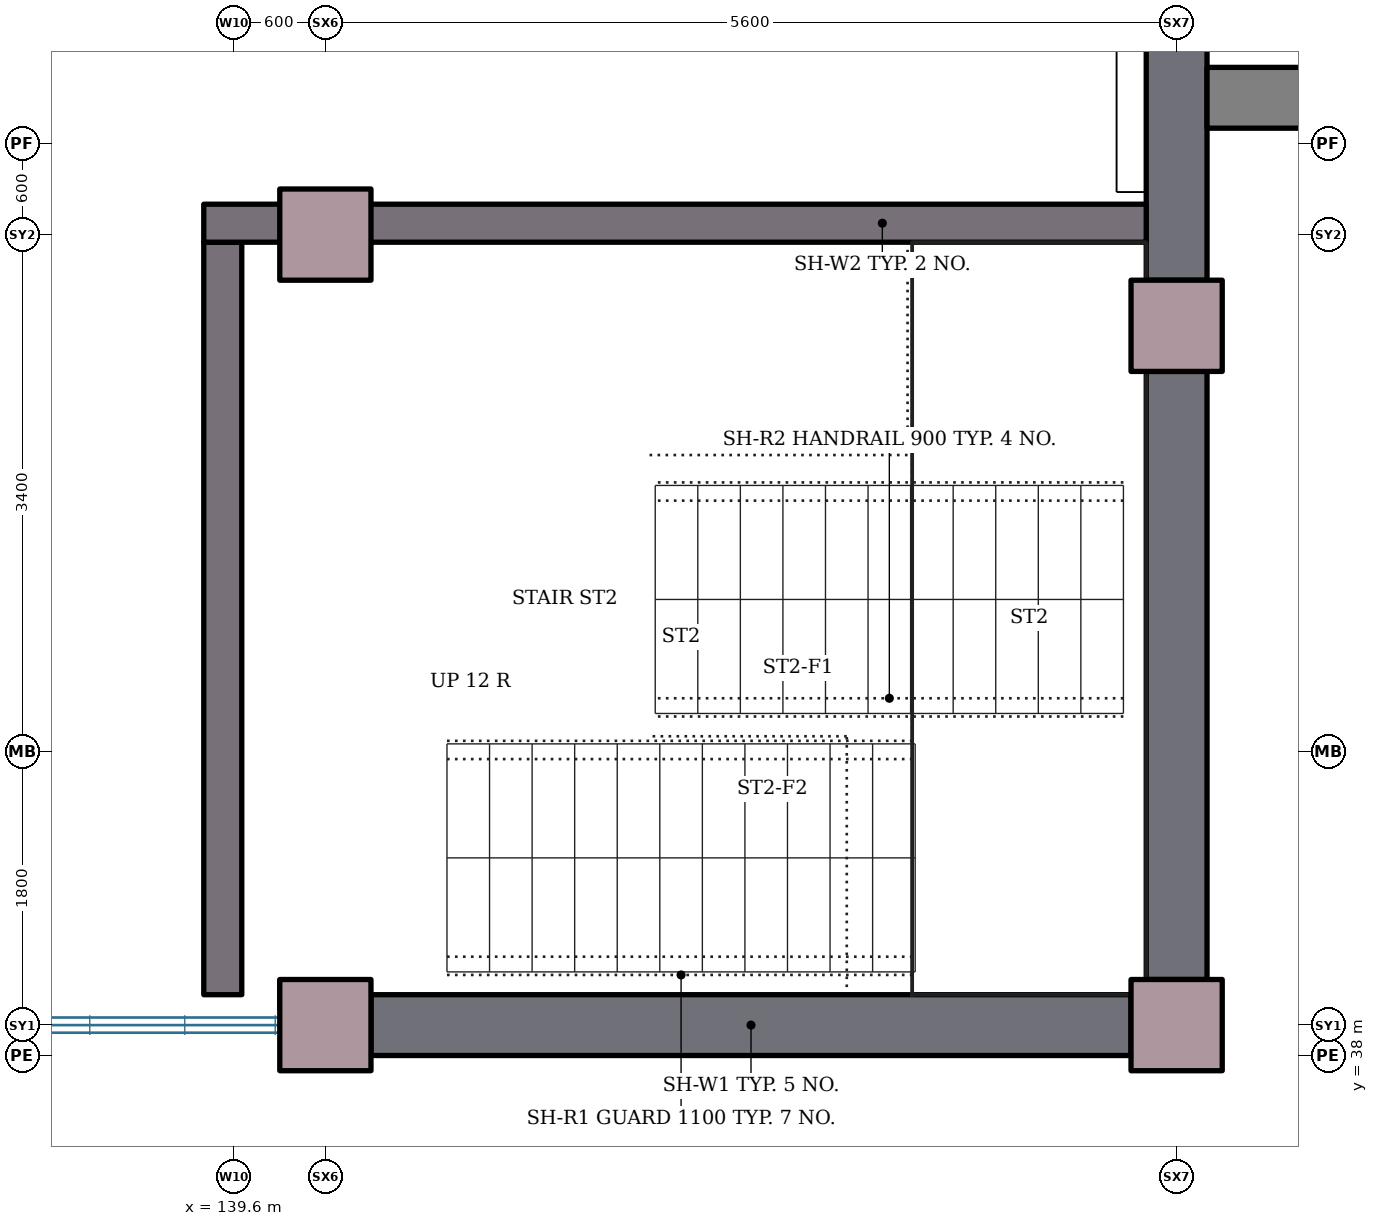
"""IFC4 building model, lengths in metres.
Left out: names, types, materials, properties, quantities, classifications, styles, units other than length and angle.
Written with IfcOpenShell. Run it as: python <this file> out.ifc"""

import sys

from ifc_helpers import new_model, si_unit, direction, frame, frame_2d, origin, origin_2d, place, context, subcontext, project, spatial, rectangle, extrude, element, fill, save


model = new_model("IFC4")
c1 = context("Model", 3, precision=1e-05, world=origin(), true_north=direction((0.0, 1.0)))
c2 = subcontext(c1, "Body", "Model", "MODEL_VIEW")
j1 = project(units=[si_unit("LENGTHUNIT", "METRE"), si_unit("PLANEANGLEUNIT", "RADIAN")], contexts=[c1])
p1 = place(None, origin())
s1 = spatial("IfcSite", under=j1, at=p1, CompositionType="ELEMENT")
p2 = place(p1, origin())
s2 = spatial("IfcBuilding", under=s1, at=p2, CompositionType="ELEMENT")
p3 = place(p2, frame((0.0, 0.0, 4.2)))
s3 = spatial("IfcBuildingStorey", under=s2, at=p3, CompositionType="ELEMENT", Elevation=4.2)
for number, where, z_axis, x_axis in (
    (1, (140.2, 38.2, 0.0), (0.0, 0.0, 1.0), (1.0, 0.0, 0.0)),
    (2, (145.8, 38.2, 0.0), (0.0, 0.0, 1.0), (1.0, 0.0, 0.0)),
    (3, (145.8, 42.8, 0.0), (0.0, 0.0, 1.0), (1.0, 0.0, 0.0)),
    (4, (140.2, 43.4, 0.0), (0.0, 0.0, 1.0), (1.0, 0.0, 0.0)),
):
    element("IfcColumn", number, at=place(p3, frame(where, z_axis=z_axis, x_axis=x_axis)), inside=s3, PredefinedType="COLUMN", context=c2, shape_type="SweptSolid", body=[
        extrude(rectangle(XDim=0.6, YDim=0.6, at=origin_2d()), origin(), (0.0, 0.0, 1.0), 4.2),
    ])
p4 = place(p3, frame((145.5, 38.2, 0.0), z_axis=(0.0, 0.0, 1.0), x_axis=(-1.0, 0.0, 0.0)))
e5 = element("IfcWall", 5, at=p4, inside=s3, PredefinedType="SOLIDWALL", context=c2, shape_type="SweptSolid", body=[
    extrude(rectangle(XDim=5.0, YDim=0.4, at=frame_2d((2.5, 0.0))), origin(), (0.0, 0.0, 1.0), 4.2),
])
p5 = place(p3, frame((145.8, 38.5, 0.0), z_axis=(0.0, 0.0, 1.0), x_axis=(0.0, 1.0, 0.0)))
e6 = element("IfcWall", 6, at=p5, inside=s3, PredefinedType="SOLIDWALL", context=c2, shape_type="SweptSolid", body=[
    extrude(rectangle(XDim=4.0, YDim=0.4, at=frame_2d((2.0, 0.0))), origin(), (0.0, 0.0, 1.0), 4.2),
])
p6 = place(p5, frame((1.55, 0.0, 0.9)))
e7 = element("IfcOpeningElement", 7, at=p6, cuts=e6, PredefinedType="OPENING", context=c2, shape_type="SweptSolid", body=[
    extrude(rectangle(XDim=0.9, YDim=1.5, at=frame_2d((0.45, 0.75))), frame((0.0, 0.21, 0.0), z_axis=(0.0, -1.0, 0.0), x_axis=(1.0, 0.0, 0.0)), (0.0, 0.0, 1.0), 0.42),
])
p7 = place(p3, frame((145.8, 43.1, 0.0), z_axis=(0.0, 0.0, 1.0), x_axis=(0.0, 1.0, 0.0)))
e8 = element("IfcWall", 8, at=p7, inside=s3, PredefinedType="SOLIDWALL", context=c2, shape_type="SweptSolid", body=[
    extrude(rectangle(XDim=4.0, YDim=0.4, at=frame_2d((2.0, 0.0))), origin(), (0.0, 0.0, 1.0), 4.2),
])
p8 = place(p7, frame((1.0, 0.0, 2.4)))
e9 = element("IfcOpeningElement", 9, at=p8, cuts=e8, PredefinedType="OPENING", context=c2, shape_type="SweptSolid", body=[
    extrude(rectangle(XDim=2.0, YDim=1.2, at=frame_2d((1.0, 0.6))), frame((0.0, 0.21, 0.0), z_axis=(0.0, -1.0, 0.0), x_axis=(1.0, 0.0, 0.0)), (0.0, 0.0, 1.0), 0.42),
])
p9 = place(p3, frame((139.525, 38.4, 0.0), z_axis=(0.0, 0.0, 1.0), x_axis=(0.0, 1.0, 0.0)))
e10 = element("IfcWall", 10, at=p9, inside=s3, PredefinedType="SHEAR", context=c2, shape_type="SweptSolid", body=[
    extrude(rectangle(XDim=4.95, YDim=0.25, at=frame_2d((2.475, 0.0))), origin(), (0.0, 0.0, 1.0), 4.2),
])
p10 = place(p3, frame((139.4, 43.475, 0.0), z_axis=(0.0, 0.0, 1.0), x_axis=(1.0, 0.0, 0.0)))
e11 = element("IfcWall", 11, at=p10, inside=s3, PredefinedType="SHEAR", context=c2, shape_type="SweptSolid", body=[
    extrude(rectangle(XDim=6.2, YDim=0.25, at=frame_2d((3.1, 0.0))), origin(), (0.0, 0.0, 1.0), 4.2),
])
p11 = place(p10, frame((1.186, 0.0, 0.0)))
e12 = element("IfcOpeningElement", 12, at=p11, cuts=e11, PredefinedType="OPENING", context=c2, shape_type="SweptSolid", body=[
    extrude(rectangle(XDim=1.8, YDim=2.1, at=frame_2d((0.9, 1.05))), frame((0.0, 0.135, 0.0), z_axis=(0.0, -1.0, 0.0), x_axis=(1.0, 0.0, 0.0)), (0.0, 0.0, 1.0), 0.27),
])
p12 = place(p3, frame((148.1, 44.3, 0.0), z_axis=(0.0, 0.0, 1.0), x_axis=(-1.0, 0.0, 0.0)))
e13 = element("IfcWall", 13, at=p12, inside=s3, PredefinedType="STANDARD", context=c2, shape_type="SweptSolid", body=[
    extrude(rectangle(XDim=2.1, YDim=0.4, at=frame_2d((1.05, 0.0))), origin(), (0.0, 0.0, 1.0), 4.2),
])
p13 = place(p3, frame((139.9, 38.4, 0.0), z_axis=(0.0, 0.0, 1.0), x_axis=(1.0, 0.0, 0.0)))
e14 = element("IfcWall", 14, at=p13, inside=s3, PredefinedType="PARTITIONING", context=c2, shape_type="SweptSolid", body=[
    extrude(rectangle(XDim=0.52, YDim=0.19, at=frame_2d((0.26, 0.0))), origin(), (0.0, 0.0, 1.0), 3.98),
])
p14 = place(p3, frame((145.5, 59.92, 0.0), z_axis=(0.0, 0.0, 1.0), x_axis=(0.0, -1.0, 0.0)))
e15 = element("IfcWall", 15, at=p14, inside=s3, PredefinedType="PARTITIONING", context=c2, shape_type="SweptSolid", body=[
    extrude(rectangle(XDim=16.24, YDim=0.19, at=frame_2d((8.12, 0.0))), origin(), (0.0, 0.0, 1.0), 3.98),
])
p15 = place(p3, frame((145.6, 42.58, 0.0), z_axis=(0.0, 0.0, 1.0), x_axis=(0.0, 1.0, 0.0)))
e16 = element("IfcWall", 16, at=p15, inside=s3, PredefinedType="PARTITIONING", context=c2, shape_type="SweptSolid", body=[
    extrude(rectangle(XDim=0.44, YDim=0.19, at=frame_2d((0.22, 0.0))), origin(), (0.0, 0.0, 1.0), 3.98),
])
p16 = place(p6, origin())
e17 = element("IfcWindow", 17, at=p16, inside=s3, PartitioningType="SINGLE_PANEL", PredefinedType="WINDOW", context=c2, shape_type="SweptSolid", body=[
    extrude(rectangle(XDim=0.9, YDim=1.5, at=frame_2d((0.45, 0.75))), frame((0.0, 0.03, 0.0), z_axis=(0.0, -1.0, 0.0), x_axis=(1.0, 0.0, 0.0)), (0.0, 0.0, 1.0), 0.06),
])
fill(e7, e17)
p17 = place(p8, origin())
e18 = element("IfcWindow", 18, at=p17, inside=s3, PartitioningType="SINGLE_PANEL", PredefinedType="WINDOW", context=c2, shape_type="SweptSolid", body=[
    extrude(rectangle(XDim=2.0, YDim=1.2, at=frame_2d((1.0, 0.6))), frame((0.0, 0.03, 0.0), z_axis=(0.0, -1.0, 0.0), x_axis=(1.0, 0.0, 0.0)), (0.0, 0.0, 1.0), 0.06),
])
fill(e9, e18)
p18 = place(p11, origin())
e19 = element("IfcDoor", 19, at=p18, inside=s3, OperationType="DOUBLE_DOOR_SINGLE_SWING", PredefinedType="DOOR", context=c2, shape_type="SweptSolid", body=[
    extrude(rectangle(XDim=1.8, YDim=2.1, at=frame_2d((0.9, 1.05))), frame((0.0, 0.025, 0.0), z_axis=(0.0, -1.0, 0.0), x_axis=(1.0, 0.0, 0.0)), (0.0, 0.0, 1.0), 0.05),
])
fill(e12, e19)
save(model, sys.argv[1])
